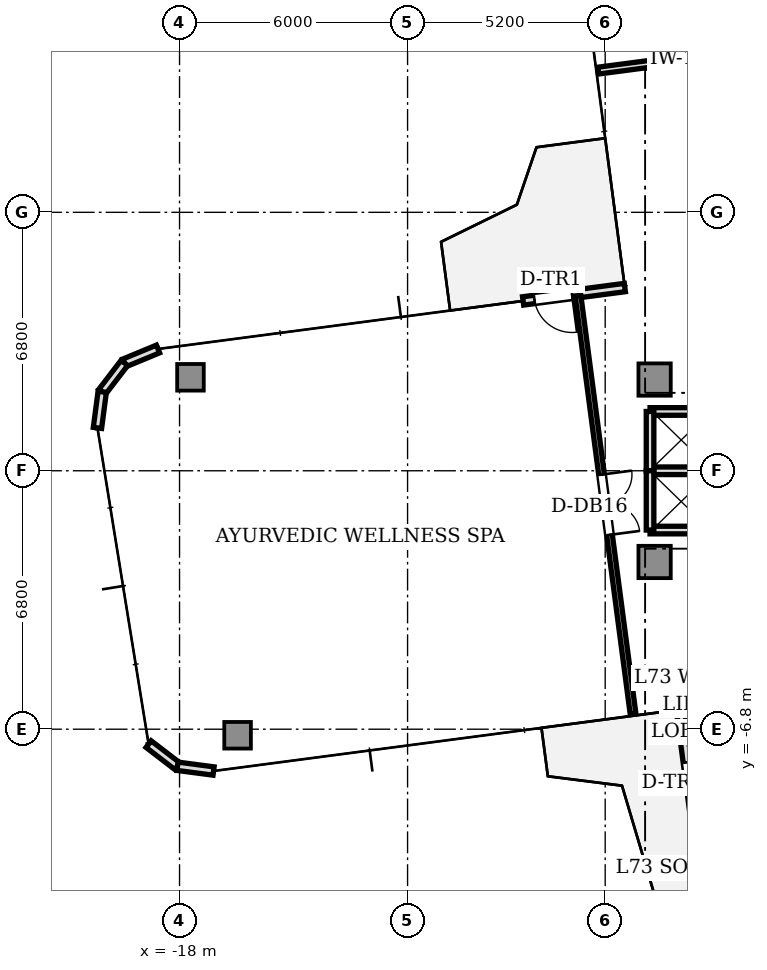
"""IFC4 building model, lengths in metres.
Left out: names, types, materials, properties, quantities, classifications, styles, units other than length and angle.
Written with IfcOpenShell. Run it as: python <this file> out.ifc"""

import sys

from ifc_helpers import new_model, si_unit, direction, frame, frame_2d, origin, origin_2d, place, context, subcontext, project, spatial, rectangle, extrude, source, transform, mapped, element, fill, save


model = new_model("IFC4")
c1 = context("Model", 3, precision=1e-05, world=origin(), true_north=direction((0.0, 1.0)))
c2 = subcontext(c1, "Body", "Model", "MODEL_VIEW")
j1 = project(units=[si_unit("LENGTHUNIT", "METRE"), si_unit("PLANEANGLEUNIT", "RADIAN")], contexts=[c1])
p1 = place(None, origin())
s1 = spatial("IfcSite", under=j1, at=p1, CompositionType="ELEMENT")
p2 = place(p1, origin())
s2 = spatial("IfcBuilding", under=s1, at=p2, CompositionType="ELEMENT")
p3 = place(p2, frame((0.0, 0.0, 261.25)))
s3 = spatial("IfcBuildingStorey", under=s2, at=p3, CompositionType="ELEMENT", Elevation=261.25)
m1 = source(origin(), c2, "Body", "SweptSolid", [
    extrude(rectangle(XDim=0.85, YDim=0.85, at=origin_2d()), origin(), (0.0, 0.0, 1.0), 3.03),
])
for number, where, z_axis, x_axis in (
    (1, (-5.5, 2.4, 0.0), (0.0, 0.0, 1.0), (1.0, 0.0, 0.0)),
    (2, (-5.5, -2.4, 0.0), (0.0, 0.0, 1.0), (1.0, 0.0, 0.0)),
):
    element("IfcColumn", number, at=place(p3, frame(where, z_axis=z_axis, x_axis=x_axis)), inside=s3, PredefinedType="COLUMN", context=c2, shape_type="MappedRepresentation", body=[
        mapped(m1, transform((0.0, 0.0, 0.0), scale=1.0)),
    ])
m2 = source(origin(), c2, "Body", "SweptSolid", [
    extrude(rectangle(XDim=0.7, YDim=0.7, at=origin_2d()), origin(), (0.0, 0.0, 1.0), 3.03),
])
for number, where, z_axis, x_axis in (
    (3, (-17.712, 2.459, 0.0), (0.0, 0.0, 1.0), (1.0, 0.0, 0.0)),
    (4, (-16.472, -6.96, 0.0), (0.0, 0.0, 1.0), (1.0, 0.0, 0.0)),
):
    element("IfcColumn", number, at=place(p3, frame(where, z_axis=z_axis, x_axis=x_axis)), inside=s3, PredefinedType="COLUMN", context=c2, shape_type="MappedRepresentation", body=[
        mapped(m2, transform((0.0, 0.0, 0.0), scale=1.0)),
    ])
p4 = place(p3, frame((-6.283, 4.821, 0.0), z_axis=(0.0, 0.0, 1.0), x_axis=(-0.991451525486, -0.130475563272, 0.0)))
e5 = element("IfcWall", 5, at=p4, inside=s3, PredefinedType="STANDARD", context=c2, shape_type="SweptSolid", body=[
    extrude(rectangle(XDim=2.7, YDim=0.22, at=frame_2d((1.35, 0.0))), origin(), (0.0, 0.0, 1.0), 3.03),
])
p5 = place(p4, frame((1.4, 0.0, 0.0)))
e6 = element("IfcOpeningElement", 6, at=p5, cuts=e5, PredefinedType="OPENING", context=c2, shape_type="SweptSolid", body=[
    extrude(rectangle(XDim=1.0, YDim=2.2, at=frame_2d((0.5, 1.1))), frame((0.0, 0.12, 0.0), z_axis=(0.0, -1.0, 0.0), x_axis=(1.0, 0.0, 0.0)), (0.0, 0.0, 1.0), 0.24),
])
p6 = place(p3, frame((-18.567, 3.204, 0.0), z_axis=(0.0, 0.0, 1.0), x_axis=(-0.923926759112, -0.382569397359, 0.0)))
e7 = element("IfcWall", 7, at=p6, inside=s3, PredefinedType="STANDARD", context=c2, shape_type="SweptSolid", body=[
    extrude(rectangle(XDim=0.958, YDim=0.22, at=frame_2d((0.479, 0.0))), origin(), (0.0, 0.0, 1.0), 3.03),
])
for number, where, z_axis, x_axis in (
    (8, (-19.452, 2.837, 0.0), (0.0, 0.0, 1.0), (-0.609, -0.793, 0.0)),
    (9, (-20.035, 2.078, 0.0), (0.0, 0.0, 1.0), (-0.131, -0.991, 0.0)),
    (10, (-18.814, -7.192, 0.0), (0.0, 0.0, 1.0), (0.793, -0.609, 0.0)),
):
    element("IfcWall", number, at=place(p3, frame(where, z_axis=z_axis, x_axis=x_axis)), inside=s3, PredefinedType="STANDARD", context=c2, shape_type="SweptSolid", body=[
        extrude(rectangle(XDim=0.958, YDim=0.22, at=frame_2d((0.479, 0.0))), origin(), (0.0, 0.0, 1.0), 3.03),
    ])
p7 = place(p3, frame((-18.055, -7.775, 0.0), z_axis=(0.0, 0.0, 1.0), x_axis=(0.991449089759, -0.130494070426, 0.0)))
e11 = element("IfcWall", 11, at=p7, inside=s3, PredefinedType="STANDARD", context=c2, shape_type="SweptSolid", body=[
    extrude(rectangle(XDim=0.958, YDim=0.22, at=frame_2d((0.479, 0.0))), origin(), (0.0, 0.0, 1.0), 3.03),
])
p8 = place(p3, frame((-4.821, -6.283, 0.0), z_axis=(0.0, 0.0, 1.0), x_axis=(0.130475563272, -0.991451525486, 0.0)))
e12 = element("IfcWall", 12, at=p8, inside=s3, PredefinedType="STANDARD", context=c2, shape_type="SweptSolid", body=[
    extrude(rectangle(XDim=2.7, YDim=0.22, at=frame_2d((1.35, 0.0))), origin(), (0.0, 0.0, 1.0), 3.03),
])
p9 = place(p8, frame((1.4, 0.0, 0.0)))
e13 = element("IfcOpeningElement", 13, at=p9, cuts=e12, PredefinedType="OPENING", context=c2, shape_type="SweptSolid", body=[
    extrude(rectangle(XDim=1.0, YDim=2.2, at=frame_2d((0.5, 1.1))), frame((0.0, 0.12, 0.0), z_axis=(0.0, -1.0, 0.0), x_axis=(1.0, 0.0, 0.0)), (0.0, 0.0, 1.0), 0.24),
])
for number, where, z_axis, x_axis in (
    (14, (-5.62, 1.56, 0.0), (0.0, 0.0, 1.0), (1.0, 0.0, 0.0)),
    (15, (-5.62, -1.56, 0.0), (0.0, 0.0, 1.0), (1.0, 0.0, 0.0)),
    (16, (-5.62, 0.0, 0.0), (0.0, 0.0, 1.0), (1.0, 0.0, 0.0)),
):
    element("IfcWall", number, at=place(p3, frame(where, z_axis=z_axis, x_axis=x_axis)), inside=s3, PredefinedType="SOLIDWALL", context=c2, shape_type="SweptSolid", body=[
        extrude(rectangle(XDim=1.64, YDim=0.2, at=frame_2d((0.82, 0.0))), origin(), (0.0, 0.0, 1.0), 2.58),
    ])
for number, where, z_axis, x_axis in (
    (17, (-5.62, 0.0, 0.0), (0.0, 0.0, 1.0), (0.0, 1.0, 0.0)),
    (18, (-5.62, -1.56, 0.0), (0.0, 0.0, 1.0), (0.0, 1.0, 0.0)),
):
    element("IfcWall", number, at=place(p3, frame(where, z_axis=z_axis, x_axis=x_axis)), inside=s3, PredefinedType="SOLIDWALL", context=c2, shape_type="SweptSolid", body=[
        extrude(rectangle(XDim=1.56, YDim=0.2, at=frame_2d((0.78, 0.0))), origin(), (0.0, 0.0, 1.0), 2.58),
    ])
p10 = place(p3, frame((-2.423, 11.129, 0.0), z_axis=(0.0, 0.0, 1.0), x_axis=(-0.991446706518, -0.130512176195, 0.0)))
e19 = element("IfcWall", 19, at=p10, inside=s3, PredefinedType="PARTITIONING", context=c2, shape_type="SweptSolid", body=[
    extrude(rectangle(XDim=4.6, YDim=0.18, at=frame_2d((2.3, 0.0))), origin(), (0.0, 0.0, 1.0), 2.58),
])
p11 = place(p3, frame((-7.516, 4.608, 0.0), z_axis=(0.0, 0.0, 1.0), x_axis=(0.130539856574, -0.991443062332, 0.0)))
e20 = element("IfcWall", 20, at=p11, inside=s3, PredefinedType="PARTITIONING", context=c2, shape_type="SweptSolid", body=[
    extrude(rectangle(XDim=11.1, YDim=0.15, at=frame_2d((5.55, 0.0))), origin(), (0.0, 0.0, 1.0), 2.58),
])
p12 = place(p11, frame((4.75, 0.0, 0.0)))
e21 = element("IfcOpeningElement", 21, at=p12, cuts=e20, PredefinedType="OPENING", context=c2, shape_type="SweptSolid", body=[
    extrude(rectangle(XDim=1.6, YDim=2.25, at=frame_2d((0.8, 1.125))), frame((0.0, 0.085, 0.0), z_axis=(0.0, -1.0, 0.0), x_axis=(1.0, 0.0, 0.0)), (0.0, 0.0, 1.0), 0.17),
])
m3 = source(origin(), c2, "Body", "SweptSolid", [
    extrude(rectangle(XDim=1.0, YDim=0.05, at=origin_2d()), origin(), (0.0, 0.0, 1.0), 2.2),
])
p13 = place(p5, frame((0.5, 0.0, 0.0)))
e22 = element("IfcDoor", 22, at=p13, inside=s3, OperationType="SINGLE_SWING_LEFT", PredefinedType="DOOR", context=c2, shape_type="MappedRepresentation", body=[
    mapped(m3, transform((0.0, 0.0, 0.0), scale=1.0)),
])
fill(e6, e22)
p14 = place(p9, frame((0.5, 0.0, 0.0)))
e23 = element("IfcDoor", 23, at=p14, inside=s3, OperationType="SINGLE_SWING_LEFT", PredefinedType="DOOR", context=c2, shape_type="MappedRepresentation", body=[
    mapped(m3, transform((0.0, 0.0, 0.0), scale=1.0)),
])
fill(e13, e23)
m4 = source(origin(), c2, "Body", "SweptSolid", [
    extrude(rectangle(XDim=1.6, YDim=0.05, at=origin_2d()), origin(), (0.0, 0.0, 1.0), 2.25),
])
p15 = place(p12, frame((0.8, 0.0, 0.0)))
e24 = element("IfcDoor", 24, at=p15, inside=s3, OperationType="DOUBLE_DOOR_SINGLE_SWING", PredefinedType="DOOR", context=c2, shape_type="MappedRepresentation", body=[
    mapped(m4, transform((0.0, 0.0, 0.0), scale=1.0)),
])
fill(e21, e24)
save(model, sys.argv[1])
